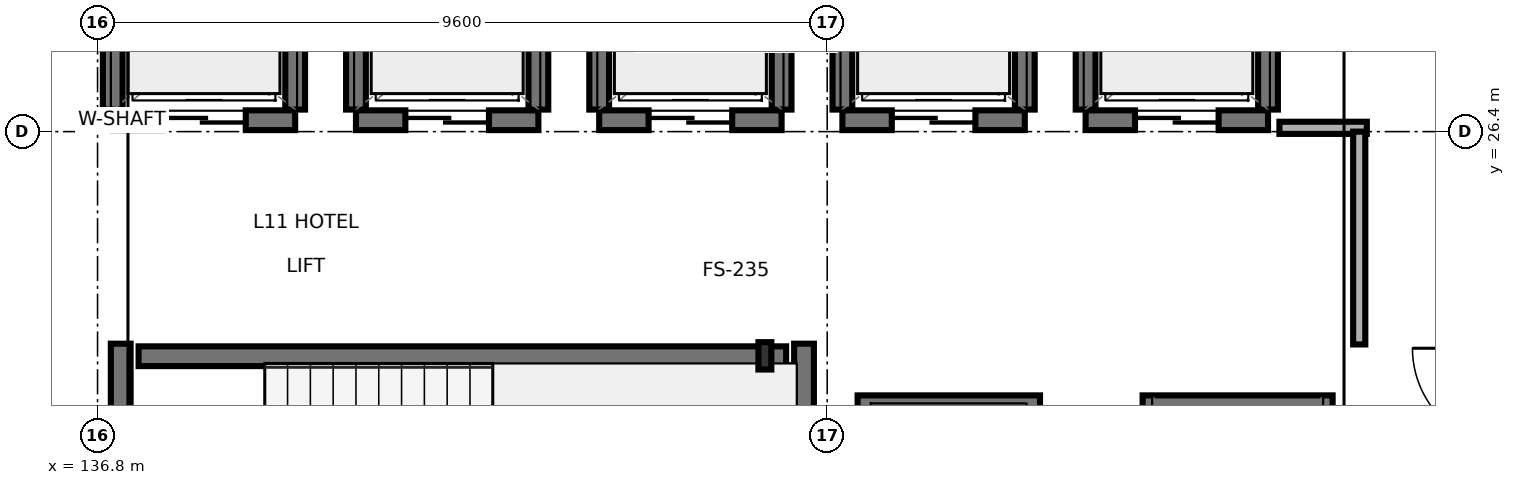
"""IFC4 building model, lengths in metres.
Left out: names, types, materials, properties, quantities, classifications, styles, units other than length and angle.
Written with IfcOpenShell. Run it as: python <this file> out.ifc"""

import sys

from ifc_helpers import new_model, si_unit, direction, frame, frame_2d, origin, origin_2d, place, context, subcontext, project, spatial, rectangle, i_section, extrude, element, fill, save


model = new_model("IFC4")
c1 = context("Model", 3, precision=1e-05, world=origin(), true_north=direction((0.0, 1.0)))
c2 = subcontext(c1, "Body", "Model", "MODEL_VIEW")
j1 = project(units=[si_unit("LENGTHUNIT", "METRE"), si_unit("PLANEANGLEUNIT", "RADIAN")], contexts=[c1])
p1 = place(None, origin())
s1 = spatial("IfcSite", under=j1, at=p1, CompositionType="ELEMENT")
p2 = place(p1, origin())
s2 = spatial("IfcBuilding", under=s1, at=p2, CompositionType="ELEMENT")
p3 = place(p2, frame((0.0, 0.0, 38.5)))
s3 = spatial("IfcBuildingStorey", under=s2, at=p3, CompositionType="ELEMENT", Elevation=38.5)
p4 = place(p3, frame((145.58, 23.45, 0.0), z_axis=(0.0, 0.0, 1.0), x_axis=(1.0, 0.0, 0.0)))
e1 = element("IfcColumn", 1, at=p4, inside=s3, PredefinedType="PILASTER", context=c2, shape_type="SweptSolid", body=[
    extrude(i_section(OverallWidth=0.17, OverallDepth=0.36, WebThickness=0.008, FlangeThickness=0.013, FilletRadius=0.018, at=origin_2d()), origin(), (0.0, 0.0, 1.0), 3.4),
])
p5 = place(p3, frame((137.105, 19.34, 0.0), z_axis=(0.0, 0.0, 1.0), x_axis=(0.0, 1.0, 0.0)))
e2 = element("IfcWall", 2, at=p5, inside=s3, PredefinedType="SHEAR", context=c2, shape_type="SweptSolid", body=[
    extrude(rectangle(XDim=4.27, YDim=0.26, at=frame_2d((2.135, 0.0))), origin(), (0.0, 0.0, 1.0), 3.15),
])
p6 = place(p5, frame((0.61, 0.0, 0.0)))
e3 = element("IfcOpeningElement", 3, at=p6, cuts=e2, PredefinedType="OPENING", context=c2, shape_type="SweptSolid", body=[
    extrude(rectangle(XDim=1.1, YDim=2.2, at=frame_2d((0.55, 1.1))), frame((0.0, 0.14, 0.0), z_axis=(0.0, -1.0, 0.0), x_axis=(1.0, 0.0, 0.0)), (0.0, 0.0, 1.0), 0.28),
])
p7 = place(p3, frame((146.095, 19.34, 0.0), z_axis=(0.0, 0.0, 1.0), x_axis=(0.0, 1.0, 0.0)))
e4 = element("IfcWall", 4, at=p7, inside=s3, PredefinedType="SHEAR", context=c2, shape_type="SweptSolid", body=[
    extrude(rectangle(XDim=4.27, YDim=0.26, at=frame_2d((2.135, 0.0))), origin(), (0.0, 0.0, 1.0), 3.15),
])
p8 = place(p3, frame((137.34, 23.445, 0.0), z_axis=(0.0, 0.0, 1.0), x_axis=(1.0, 0.0, 0.0)))
e5 = element("IfcWall", 5, at=p8, inside=s3, PredefinedType="SHEAR", context=c2, shape_type="SweptSolid", body=[
    extrude(rectangle(XDim=8.52, YDim=0.26, at=frame_2d((4.26, 0.0))), origin(), (0.0, 0.0, 1.0), 3.15),
])
p9 = place(p3, frame((137.0, 26.55, 0.0), z_axis=(0.0, 0.0, 1.0), x_axis=(1.0, 0.0, 0.0)))
e6 = element("IfcWall", 6, at=p9, inside=s3, PredefinedType="SHEAR", context=c2, shape_type="SweptSolid", body=[
    extrude(rectangle(XDim=2.4, YDim=0.26, at=frame_2d((1.2, 0.0))), origin(), (0.0, 0.0, 1.0), 2.685),
])
p10 = place(p9, frame((0.65, 0.0, 0.0)))
e7 = element("IfcOpeningElement", 7, at=p10, cuts=e6, PredefinedType="OPENING", context=c2, shape_type="SweptSolid", body=[
    extrude(rectangle(XDim=1.1, YDim=2.2, at=frame_2d((0.55, 1.1))), frame((0.0, 0.14, 0.0), z_axis=(0.0, -1.0, 0.0), x_axis=(1.0, 0.0, 0.0)), (0.0, 0.0, 1.0), 0.28),
])
for number, where, z_axis, x_axis in (
    (8, (137.0, 26.69, 0.0), (0.0, 0.0, 1.0), (0.0, 1.0, 0.0)),
    (9, (139.4, 26.69, 0.0), (0.0, 0.0, 1.0), (0.0, 1.0, 0.0)),
):
    element("IfcWall", number, at=place(p3, frame(where, z_axis=z_axis, x_axis=x_axis)), inside=s3, PredefinedType="SHEAR", context=c2, shape_type="SweptSolid", body=[
        extrude(rectangle(XDim=1.82, YDim=0.26, at=frame_2d((0.91, 0.0))), origin(), (0.0, 0.0, 1.0), 2.685),
    ])
p11 = place(p3, frame((140.2, 26.55, 0.0), z_axis=(0.0, 0.0, 1.0), x_axis=(1.0, 0.0, 0.0)))
e10 = element("IfcWall", 10, at=p11, inside=s3, PredefinedType="SHEAR", context=c2, shape_type="SweptSolid", body=[
    extrude(rectangle(XDim=2.4, YDim=0.26, at=frame_2d((1.2, 0.0))), origin(), (0.0, 0.0, 1.0), 3.15),
])
p12 = place(p11, frame((0.65, 0.0, 0.0)))
e11 = element("IfcOpeningElement", 11, at=p12, cuts=e10, PredefinedType="OPENING", context=c2, shape_type="SweptSolid", body=[
    extrude(rectangle(XDim=1.1, YDim=2.2, at=frame_2d((0.55, 1.1))), frame((0.0, 0.14, 0.0), z_axis=(0.0, -1.0, 0.0), x_axis=(1.0, 0.0, 0.0)), (0.0, 0.0, 1.0), 0.28),
])
for number, where, z_axis, x_axis in (
    (12, (140.2, 26.69, 0.0), (0.0, 0.0, 1.0), (0.0, 1.0, 0.0)),
    (13, (142.6, 26.69, 0.0), (0.0, 0.0, 1.0), (0.0, 1.0, 0.0)),
):
    element("IfcWall", number, at=place(p3, frame(where, z_axis=z_axis, x_axis=x_axis)), inside=s3, PredefinedType="SHEAR", context=c2, shape_type="SweptSolid", body=[
        extrude(rectangle(XDim=1.82, YDim=0.26, at=frame_2d((0.91, 0.0))), origin(), (0.0, 0.0, 1.0), 3.15),
    ])
p13 = place(p3, frame((143.4, 26.55, 0.0), z_axis=(0.0, 0.0, 1.0), x_axis=(1.0, 0.0, 0.0)))
e14 = element("IfcWall", 14, at=p13, inside=s3, PredefinedType="SHEAR", context=c2, shape_type="SweptSolid", body=[
    extrude(rectangle(XDim=2.4, YDim=0.26, at=frame_2d((1.2, 0.0))), origin(), (0.0, 0.0, 1.0), 3.15),
])
p14 = place(p13, frame((0.65, 0.0, 0.0)))
e15 = element("IfcOpeningElement", 15, at=p14, cuts=e14, PredefinedType="OPENING", context=c2, shape_type="SweptSolid", body=[
    extrude(rectangle(XDim=1.1, YDim=2.2, at=frame_2d((0.55, 1.1))), frame((0.0, 0.14, 0.0), z_axis=(0.0, -1.0, 0.0), x_axis=(1.0, 0.0, 0.0)), (0.0, 0.0, 1.0), 0.28),
])
for number, where, z_axis, x_axis in (
    (16, (143.4, 26.69, 0.0), (0.0, 0.0, 1.0), (0.0, 1.0, 0.0)),
    (17, (145.8, 26.69, 0.0), (0.0, 0.0, 1.0), (0.0, 1.0, 0.0)),
):
    element("IfcWall", number, at=place(p3, frame(where, z_axis=z_axis, x_axis=x_axis)), inside=s3, PredefinedType="SHEAR", context=c2, shape_type="SweptSolid", body=[
        extrude(rectangle(XDim=1.82, YDim=0.26, at=frame_2d((0.91, 0.0))), origin(), (0.0, 0.0, 1.0), 3.15),
    ])
p15 = place(p3, frame((146.6, 26.55, 0.0), z_axis=(0.0, 0.0, 1.0), x_axis=(1.0, 0.0, 0.0)))
e18 = element("IfcWall", 18, at=p15, inside=s3, PredefinedType="SHEAR", context=c2, shape_type="SweptSolid", body=[
    extrude(rectangle(XDim=2.4, YDim=0.26, at=frame_2d((1.2, 0.0))), origin(), (0.0, 0.0, 1.0), 3.15),
])
p16 = place(p15, frame((0.65, 0.0, 0.0)))
e19 = element("IfcOpeningElement", 19, at=p16, cuts=e18, PredefinedType="OPENING", context=c2, shape_type="SweptSolid", body=[
    extrude(rectangle(XDim=1.1, YDim=2.2, at=frame_2d((0.55, 1.1))), frame((0.0, 0.14, 0.0), z_axis=(0.0, -1.0, 0.0), x_axis=(1.0, 0.0, 0.0)), (0.0, 0.0, 1.0), 0.28),
])
for number, where, z_axis, x_axis in (
    (20, (146.6, 26.69, 0.0), (0.0, 0.0, 1.0), (0.0, 1.0, 0.0)),
    (21, (149.0, 26.69, 0.0), (0.0, 0.0, 1.0), (0.0, 1.0, 0.0)),
):
    element("IfcWall", number, at=place(p3, frame(where, z_axis=z_axis, x_axis=x_axis)), inside=s3, PredefinedType="SHEAR", context=c2, shape_type="SweptSolid", body=[
        extrude(rectangle(XDim=1.82, YDim=0.26, at=frame_2d((0.91, 0.0))), origin(), (0.0, 0.0, 1.0), 3.15),
    ])
p17 = place(p3, frame((149.8, 26.55, 0.0), z_axis=(0.0, 0.0, 1.0), x_axis=(1.0, 0.0, 0.0)))
e22 = element("IfcWall", 22, at=p17, inside=s3, PredefinedType="SHEAR", context=c2, shape_type="SweptSolid", body=[
    extrude(rectangle(XDim=2.4, YDim=0.26, at=frame_2d((1.2, 0.0))), origin(), (0.0, 0.0, 1.0), 3.15),
])
p18 = place(p17, frame((0.65, 0.0, 0.0)))
e23 = element("IfcOpeningElement", 23, at=p18, cuts=e22, PredefinedType="OPENING", context=c2, shape_type="SweptSolid", body=[
    extrude(rectangle(XDim=1.1, YDim=2.2, at=frame_2d((0.55, 1.1))), frame((0.0, 0.14, 0.0), z_axis=(0.0, -1.0, 0.0), x_axis=(1.0, 0.0, 0.0)), (0.0, 0.0, 1.0), 0.28),
])
for number, where, z_axis, x_axis in (
    (24, (149.8, 26.69, 0.0), (0.0, 0.0, 1.0), (0.0, 1.0, 0.0)),
    (25, (152.2, 26.69, 0.0), (0.0, 0.0, 1.0), (0.0, 1.0, 0.0)),
):
    element("IfcWall", number, at=place(p3, frame(where, z_axis=z_axis, x_axis=x_axis)), inside=s3, PredefinedType="SHEAR", context=c2, shape_type="SweptSolid", body=[
        extrude(rectangle(XDim=1.82, YDim=0.26, at=frame_2d((0.91, 0.0))), origin(), (0.0, 0.0, 1.0), 3.15),
    ])
p19 = place(p3, frame((146.8, 22.8, 0.0), z_axis=(0.0, 0.0, 1.0), x_axis=(1.0, 0.0, 0.0)))
e26 = element("IfcWall", 26, at=p19, inside=s3, PredefinedType="SHEAR", context=c2, shape_type="SweptSolid", body=[
    extrude(rectangle(XDim=2.4, YDim=0.26, at=frame_2d((1.2, 0.0))), origin(), (0.0, 0.0, 1.0), 3.15),
])
p20 = place(p3, frame((150.55, 22.8, 0.0), z_axis=(0.0, 0.0, 1.0), x_axis=(1.0, 0.0, 0.0)))
e27 = element("IfcWall", 27, at=p20, inside=s3, PredefinedType="SHEAR", context=c2, shape_type="SweptSolid", body=[
    extrude(rectangle(XDim=2.5, YDim=0.26, at=frame_2d((1.25, 0.0))), origin(), (0.0, 0.0, 1.0), 3.15),
])
p21 = place(p3, frame((152.35, 26.45, 0.0), z_axis=(0.0, 0.0, 1.0), x_axis=(1.0, 0.0, 0.0)))
e28 = element("IfcWall", 28, at=p21, inside=s3, PredefinedType="PARTITIONING", context=c2, shape_type="SweptSolid", body=[
    extrude(rectangle(XDim=1.15, YDim=0.16, at=frame_2d((0.575, 0.0))), origin(), (0.0, 0.0, 1.0), 3.15),
])
p22 = place(p3, frame((153.4, 23.6, 0.0), z_axis=(0.0, 0.0, 1.0), x_axis=(0.0, 1.0, 0.0)))
e29 = element("IfcWall", 29, at=p22, inside=s3, PredefinedType="PARTITIONING", context=c2, shape_type="SweptSolid", body=[
    extrude(rectangle(XDim=2.8, YDim=0.16, at=frame_2d((1.4, 0.0))), origin(), (0.0, 0.0, 1.0), 3.15),
])
p23 = place(p10, origin())
e30 = element("IfcDoor", 30, at=p23, inside=s3, OperationType="SLIDING_TO_LEFT", PredefinedType="DOOR", context=c2, shape_type="SweptSolid", body=[
    extrude(rectangle(XDim=1.1, YDim=2.2, at=frame_2d((0.55, 1.1))), frame((0.0, 0.025, 0.0), z_axis=(0.0, -1.0, 0.0), x_axis=(1.0, 0.0, 0.0)), (0.0, 0.0, 1.0), 0.05),
])
fill(e7, e30)
p24 = place(p12, origin())
e31 = element("IfcDoor", 31, at=p24, inside=s3, OperationType="SLIDING_TO_RIGHT", PredefinedType="DOOR", context=c2, shape_type="SweptSolid", body=[
    extrude(rectangle(XDim=1.1, YDim=2.2, at=frame_2d((0.55, 1.1))), frame((0.0, 0.025, 0.0), z_axis=(0.0, -1.0, 0.0), x_axis=(1.0, 0.0, 0.0)), (0.0, 0.0, 1.0), 0.05),
])
fill(e11, e31)
p25 = place(p14, origin())
e32 = element("IfcDoor", 32, at=p25, inside=s3, OperationType="SLIDING_TO_LEFT", PredefinedType="DOOR", context=c2, shape_type="SweptSolid", body=[
    extrude(rectangle(XDim=1.1, YDim=2.2, at=frame_2d((0.55, 1.1))), frame((0.0, 0.025, 0.0), z_axis=(0.0, -1.0, 0.0), x_axis=(1.0, 0.0, 0.0)), (0.0, 0.0, 1.0), 0.05),
])
fill(e15, e32)
p26 = place(p16, origin())
e33 = element("IfcDoor", 33, at=p26, inside=s3, OperationType="SLIDING_TO_RIGHT", PredefinedType="DOOR", context=c2, shape_type="SweptSolid", body=[
    extrude(rectangle(XDim=1.1, YDim=2.2, at=frame_2d((0.55, 1.1))), frame((0.0, 0.025, 0.0), z_axis=(0.0, -1.0, 0.0), x_axis=(1.0, 0.0, 0.0)), (0.0, 0.0, 1.0), 0.05),
])
fill(e19, e33)
p27 = place(p18, origin())
e34 = element("IfcDoor", 34, at=p27, inside=s3, OperationType="SLIDING_TO_LEFT", PredefinedType="DOOR", context=c2, shape_type="SweptSolid", body=[
    extrude(rectangle(XDim=1.1, YDim=2.2, at=frame_2d((0.55, 1.1))), frame((0.0, 0.025, 0.0), z_axis=(0.0, -1.0, 0.0), x_axis=(1.0, 0.0, 0.0)), (0.0, 0.0, 1.0), 0.05),
])
fill(e23, e34)
save(model, sys.argv[1])
